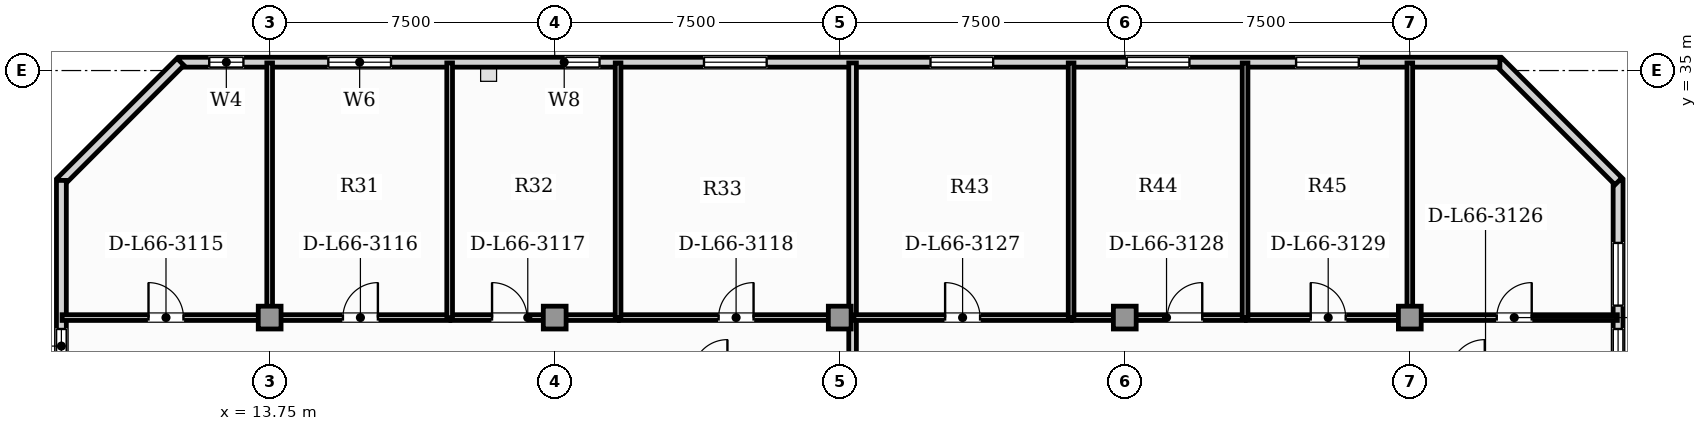
"""IFC4 building model, lengths in metres.
Left out: names, types, materials, properties, quantities, classifications, styles, units other than length and angle.
Written with IfcOpenShell. Run it as: python <this file> out.ifc"""

import sys

from ifc_helpers import new_model, si_unit, direction, frame, frame_2d, origin, origin_2d, place, context, subcontext, project, spatial, rectangle, extrude, element, fill, save


model = new_model("IFC4")
c1 = context("Model", 3, precision=1e-05, world=origin(), true_north=direction((0.0, 1.0)))
c2 = subcontext(c1, "Body", "Model", "MODEL_VIEW")
j1 = project(units=[si_unit("LENGTHUNIT", "METRE"), si_unit("PLANEANGLEUNIT", "RADIAN")], contexts=[c1])
p1 = place(None, origin())
s1 = spatial("IfcSite", under=j1, at=p1, CompositionType="ELEMENT")
p2 = place(p1, origin())
s2 = spatial("IfcBuilding", under=s1, at=p2, CompositionType="ELEMENT")
p3 = place(p2, frame((0.0, 0.0, 268.3)))
s3 = spatial("IfcBuildingStorey", under=s2, at=p3, CompositionType="ELEMENT", Elevation=268.3)
for number, where, z_axis, x_axis in (
    (1, (13.75, 28.5, 0.0), (0.0, 0.0, 1.0), (1.0, 0.0, 0.0)),
    (2, (21.25, 28.5, 0.0), (0.0, 0.0, 1.0), (1.0, 0.0, 0.0)),
    (3, (28.75, 28.5, 0.0), (0.0, 0.0, 1.0), (1.0, 0.0, 0.0)),
    (4, (36.25, 28.5, 0.0), (0.0, 0.0, 1.0), (1.0, 0.0, 0.0)),
    (5, (43.75, 28.5, 0.0), (0.0, 0.0, 1.0), (1.0, 0.0, 0.0)),
):
    element("IfcColumn", number, at=place(p3, frame(where, z_axis=z_axis, x_axis=x_axis)), inside=s3, PredefinedType="COLUMN", context=c2, shape_type="SweptSolid", body=[
        extrude(rectangle(XDim=0.6, YDim=0.6, at=origin_2d()), origin(), (0.0, 0.0, 1.0), 3.85),
    ])
p4 = place(p3, frame((49.23, 24.315, 0.0), z_axis=(0.0, 0.0, 1.0), x_axis=(0.0, 1.0, 0.0)))
e6 = element("IfcWall", 6, at=p4, inside=s3, PredefinedType="SOLIDWALL", context=c2, shape_type="SweptSolid", body=[
    extrude(rectangle(XDim=7.795, YDim=0.26, at=frame_2d((3.897, 0.0))), origin(), (0.0, 0.0, 1.0), 3.65),
])
p5 = place(p4, frame((2.985, 0.0, 0.95)))
e7 = element("IfcOpeningElement", 7, at=p5, cuts=e6, PredefinedType="OPENING", context=c2, shape_type="SweptSolid", body=[
    extrude(rectangle(XDim=0.9, YDim=1.5, at=frame_2d((0.45, 0.75))), frame((0.0, 0.14, 0.0), z_axis=(0.0, -1.0, 0.0), x_axis=(1.0, 0.0, 0.0)), (0.0, 0.0, 1.0), 0.28),
])
p6 = place(p4, frame((4.5, 0.0, 0.88)))
e8 = element("IfcOpeningElement", 8, at=p6, cuts=e6, PredefinedType="OPENING", context=c2, shape_type="SweptSolid", body=[
    extrude(rectangle(XDim=1.65, YDim=2.0, at=frame_2d((0.825, 1.0))), frame((0.0, 0.14, 0.0), z_axis=(0.0, -1.0, 0.0), x_axis=(1.0, 0.0, 0.0)), (0.0, 0.0, 1.0), 0.28),
])
p7 = place(p3, frame((49.24, 32.086, 0.0), z_axis=(0.0, 0.0, 1.0), x_axis=(-0.707079321262, 0.707134240044, 0.0)))
e9 = element("IfcWall", 9, at=p7, inside=s3, PredefinedType="SOLIDWALL", context=c2, shape_type="SweptSolid", body=[
    extrude(rectangle(XDim=4.446, YDim=0.26, at=frame_2d((2.223, 0.0))), origin(), (0.0, 0.0, 1.0), 3.65),
])
p8 = place(p3, frame((46.12, 35.219, 0.0), z_axis=(0.0, 0.0, 1.0), x_axis=(-1.0, 0.0, 0.0)))
e10 = element("IfcWall", 10, at=p8, inside=s3, PredefinedType="SOLIDWALL", context=c2, shape_type="SweptSolid", body=[
    extrude(rectangle(XDim=34.74, YDim=0.26, at=frame_2d((17.37, 0.0))), origin(), (0.0, 0.0, 1.0), 3.65),
])
p9 = place(p8, frame((33.06, 0.0, 0.95)))
e11 = element("IfcOpeningElement", 11, at=p9, cuts=e10, PredefinedType="OPENING", context=c2, shape_type="SweptSolid", body=[
    extrude(rectangle(XDim=0.9, YDim=1.5, at=frame_2d((0.45, 0.75))), frame((0.0, 0.14, 0.0), z_axis=(0.0, -1.0, 0.0), x_axis=(1.0, 0.0, 0.0)), (0.0, 0.0, 1.0), 0.28),
])
p10 = place(p8, frame((29.177, 0.0, 0.88)))
e12 = element("IfcOpeningElement", 12, at=p10, cuts=e10, PredefinedType="OPENING", context=c2, shape_type="SweptSolid", body=[
    extrude(rectangle(XDim=1.65, YDim=2.0, at=frame_2d((0.825, 1.0))), frame((0.0, 0.14, 0.0), z_axis=(0.0, -1.0, 0.0), x_axis=(1.0, 0.0, 0.0)), (0.0, 0.0, 1.0), 0.28),
])
p11 = place(p8, frame((23.69, 0.0, 0.9)))
e13 = element("IfcOpeningElement", 13, at=p11, cuts=e10, PredefinedType="OPENING", context=c2, shape_type="SweptSolid", body=[
    extrude(rectangle(XDim=0.9, YDim=1.4, at=frame_2d((0.45, 0.7))), frame((0.0, 0.14, 0.0), z_axis=(0.0, -1.0, 0.0), x_axis=(1.0, 0.0, 0.0)), (0.0, 0.0, 1.0), 0.28),
])
p12 = place(p8, frame((19.292, 0.0, 0.88)))
e14 = element("IfcOpeningElement", 14, at=p12, cuts=e10, PredefinedType="OPENING", context=c2, shape_type="SweptSolid", body=[
    extrude(rectangle(XDim=1.65, YDim=2.0, at=frame_2d((0.825, 1.0))), frame((0.0, 0.14, 0.0), z_axis=(0.0, -1.0, 0.0), x_axis=(1.0, 0.0, 0.0)), (0.0, 0.0, 1.0), 0.28),
])
p13 = place(p8, frame((13.332, 0.0, 0.88)))
e15 = element("IfcOpeningElement", 15, at=p13, cuts=e10, PredefinedType="OPENING", context=c2, shape_type="SweptSolid", body=[
    extrude(rectangle(XDim=1.65, YDim=2.0, at=frame_2d((0.825, 1.0))), frame((0.0, 0.14, 0.0), z_axis=(0.0, -1.0, 0.0), x_axis=(1.0, 0.0, 0.0)), (0.0, 0.0, 1.0), 0.28),
])
p14 = place(p8, frame((8.169, 0.0, 0.88)))
e16 = element("IfcOpeningElement", 16, at=p14, cuts=e10, PredefinedType="OPENING", context=c2, shape_type="SweptSolid", body=[
    extrude(rectangle(XDim=1.65, YDim=2.0, at=frame_2d((0.825, 1.0))), frame((0.0, 0.14, 0.0), z_axis=(0.0, -1.0, 0.0), x_axis=(1.0, 0.0, 0.0)), (0.0, 0.0, 1.0), 0.28),
])
p15 = place(p8, frame((3.712, 0.0, 0.88)))
e17 = element("IfcOpeningElement", 17, at=p15, cuts=e10, PredefinedType="OPENING", context=c2, shape_type="SweptSolid", body=[
    extrude(rectangle(XDim=1.65, YDim=2.0, at=frame_2d((0.825, 1.0))), frame((0.0, 0.14, 0.0), z_axis=(0.0, -1.0, 0.0), x_axis=(1.0, 0.0, 0.0)), (0.0, 0.0, 1.0), 0.28),
])
p16 = place(p3, frame((11.403, 35.229, 0.0), z_axis=(0.0, 0.0, 1.0), x_axis=(-0.707079321262, -0.707134240044, 0.0)))
e18 = element("IfcWall", 18, at=p16, inside=s3, PredefinedType="SOLIDWALL", context=c2, shape_type="SweptSolid", body=[
    extrude(rectangle(XDim=4.446, YDim=0.26, at=frame_2d((2.223, 0.0))), origin(), (0.0, 0.0, 1.0), 3.65),
])
p17 = place(p3, frame((8.27, 32.109, 0.0), z_axis=(0.0, 0.0, 1.0), x_axis=(0.0, -1.0, 0.0)))
e19 = element("IfcWall", 19, at=p17, inside=s3, PredefinedType="SOLIDWALL", context=c2, shape_type="SweptSolid", body=[
    extrude(rectangle(XDim=7.795, YDim=0.26, at=frame_2d((3.897, 0.0))), origin(), (0.0, 0.0, 1.0), 3.65),
])
p18 = place(p17, frame((3.909, 0.0, 0.95)))
e20 = element("IfcOpeningElement", 20, at=p18, cuts=e19, PredefinedType="OPENING", context=c2, shape_type="SweptSolid", body=[
    extrude(rectangle(XDim=0.9, YDim=1.5, at=frame_2d((0.45, 0.75))), frame((0.0, 0.14, 0.0), z_axis=(0.0, -1.0, 0.0), x_axis=(1.0, 0.0, 0.0)), (0.0, 0.0, 1.0), 0.28),
])
p19 = place(p3, frame((8.289, 28.5, 0.0), z_axis=(0.0, 0.0, 1.0), x_axis=(1.0, 0.0, 0.0)))
e21 = element("IfcWall", 21, at=p19, inside=s3, PredefinedType="PARTITIONING", context=c2, shape_type="SweptSolid", body=[
    extrude(rectangle(XDim=5.466, YDim=0.15, at=frame_2d((2.733, 0.0))), origin(), (0.0, 0.0, 1.0), 3.65),
])
p20 = place(p19, frame((2.273, 0.0, 0.0)))
e22 = element("IfcOpeningElement", 22, at=p20, cuts=e21, PredefinedType="OPENING", context=c2, shape_type="SweptSolid", body=[
    extrude(rectangle(XDim=0.92, YDim=2.1, at=frame_2d((0.46, 1.05))), frame((0.0, 0.085, 0.0), z_axis=(0.0, -1.0, 0.0), x_axis=(1.0, 0.0, 0.0)), (0.0, 0.0, 1.0), 0.17),
])
p21 = place(p3, frame((13.785, 28.5, 0.0), z_axis=(0.0, 0.0, 1.0), x_axis=(1.0, 0.0, 0.0)))
e23 = element("IfcWall", 23, at=p21, inside=s3, PredefinedType="PARTITIONING", context=c2, shape_type="SweptSolid", body=[
    extrude(rectangle(XDim=4.706, YDim=0.15, at=frame_2d((2.353, 0.0))), origin(), (0.0, 0.0, 1.0), 3.105),
])
p22 = place(p21, frame((1.893, 0.0, 0.0)))
e24 = element("IfcOpeningElement", 24, at=p22, cuts=e23, PredefinedType="OPENING", context=c2, shape_type="SweptSolid", body=[
    extrude(rectangle(XDim=0.92, YDim=2.1, at=frame_2d((0.46, 1.05))), frame((0.0, 0.085, 0.0), z_axis=(0.0, -1.0, 0.0), x_axis=(1.0, 0.0, 0.0)), (0.0, 0.0, 1.0), 0.17),
])
p23 = place(p3, frame((18.521, 28.5, 0.0), z_axis=(0.0, 0.0, 1.0), x_axis=(1.0, 0.0, 0.0)))
e25 = element("IfcWall", 25, at=p23, inside=s3, PredefinedType="PARTITIONING", context=c2, shape_type="SweptSolid", body=[
    extrude(rectangle(XDim=4.402, YDim=0.15, at=frame_2d((2.201, 0.0))), origin(), (0.0, 0.0, 1.0), 3.105),
])
p24 = place(p23, frame((1.081, 0.0, 0.0)))
e26 = element("IfcOpeningElement", 26, at=p24, cuts=e25, PredefinedType="OPENING", context=c2, shape_type="SweptSolid", body=[
    extrude(rectangle(XDim=0.92, YDim=2.1, at=frame_2d((0.46, 1.05))), frame((0.0, 0.085, 0.0), z_axis=(0.0, -1.0, 0.0), x_axis=(1.0, 0.0, 0.0)), (0.0, 0.0, 1.0), 0.17),
])
p25 = place(p3, frame((22.953, 28.5, 0.0), z_axis=(0.0, 0.0, 1.0), x_axis=(1.0, 0.0, 0.0)))
e27 = element("IfcWall", 27, at=p25, inside=s3, PredefinedType="PARTITIONING", context=c2, shape_type="SweptSolid", body=[
    extrude(rectangle(XDim=6.14, YDim=0.15, at=frame_2d((3.07, 0.0))), origin(), (0.0, 0.0, 1.0), 3.105),
])
p26 = place(p25, frame((2.61, 0.0, 0.0)))
e28 = element("IfcOpeningElement", 28, at=p26, cuts=e27, PredefinedType="OPENING", context=c2, shape_type="SweptSolid", body=[
    extrude(rectangle(XDim=0.92, YDim=2.1, at=frame_2d((0.46, 1.05))), frame((0.0, 0.085, 0.0), z_axis=(0.0, -1.0, 0.0), x_axis=(1.0, 0.0, 0.0)), (0.0, 0.0, 1.0), 0.17),
])
p27 = place(p3, frame((29.088, 26.995, 0.0), z_axis=(0.0, 0.0, 1.0), x_axis=(0.0, 1.0, 0.0)))
e29 = element("IfcWall", 29, at=p27, inside=s3, PredefinedType="PARTITIONING", context=c2, shape_type="SweptSolid", body=[
    extrude(rectangle(XDim=1.51, YDim=0.2, at=frame_2d((0.755, 0.0))), origin(), (0.0, 0.0, 1.0), 3.65),
])
for number, where, z_axis, x_axis in (
    (30, (13.75, 28.495, 0.0), (0.0, 0.0, 1.0), (0.0, 1.0, 0.0)),
    (31, (18.486, 28.495, 0.0), (0.0, 0.0, 1.0), (0.0, 1.0, 0.0)),
    (32, (22.918, 28.495, 0.0), (0.0, 0.0, 1.0), (0.0, 1.0, 0.0)),
):
    element("IfcWall", number, at=place(p3, frame(where, z_axis=z_axis, x_axis=x_axis)), inside=s3, PredefinedType="PARTITIONING", context=c2, shape_type="SweptSolid", body=[
        extrude(rectangle(XDim=6.705, YDim=0.15, at=frame_2d((3.353, 0.0))), origin(), (0.0, 0.0, 1.0), 3.65),
    ])
p28 = place(p3, frame((29.088, 28.535, 0.0), z_axis=(0.0, 0.0, 1.0), x_axis=(0.0, 1.0, 0.0)))
e33 = element("IfcWall", 33, at=p28, inside=s3, PredefinedType="PARTITIONING", context=c2, shape_type="SweptSolid", body=[
    extrude(rectangle(XDim=6.665, YDim=0.2, at=frame_2d((3.333, 0.0))), origin(), (0.0, 0.0, 1.0), 3.65),
])
p29 = place(p3, frame((29.123, 28.5, 0.0), z_axis=(0.0, 0.0, 1.0), x_axis=(1.0, 0.0, 0.0)))
e34 = element("IfcWall", 34, at=p29, inside=s3, PredefinedType="PARTITIONING", context=c2, shape_type="SweptSolid", body=[
    extrude(rectangle(XDim=5.72, YDim=0.15, at=frame_2d((2.86, 0.0))), origin(), (0.0, 0.0, 1.0), 3.105),
])
p30 = place(p29, frame((2.4, 0.0, 0.0)))
e35 = element("IfcOpeningElement", 35, at=p30, cuts=e34, PredefinedType="OPENING", context=c2, shape_type="SweptSolid", body=[
    extrude(rectangle(XDim=0.92, YDim=2.1, at=frame_2d((0.46, 1.05))), frame((0.0, 0.085, 0.0), z_axis=(0.0, -1.0, 0.0), x_axis=(1.0, 0.0, 0.0)), (0.0, 0.0, 1.0), 0.17),
])
p31 = place(p3, frame((34.873, 28.5, 0.0), z_axis=(0.0, 0.0, 1.0), x_axis=(1.0, 0.0, 0.0)))
e36 = element("IfcWall", 36, at=p31, inside=s3, PredefinedType="PARTITIONING", context=c2, shape_type="SweptSolid", body=[
    extrude(rectangle(XDim=4.548, YDim=0.15, at=frame_2d((2.274, 0.0))), origin(), (0.0, 0.0, 1.0), 3.105),
])
p32 = place(p31, frame((2.496, 0.0, 0.0)))
e37 = element("IfcOpeningElement", 37, at=p32, cuts=e36, PredefinedType="OPENING", context=c2, shape_type="SweptSolid", body=[
    extrude(rectangle(XDim=0.92, YDim=2.1, at=frame_2d((0.46, 1.05))), frame((0.0, 0.085, 0.0), z_axis=(0.0, -1.0, 0.0), x_axis=(1.0, 0.0, 0.0)), (0.0, 0.0, 1.0), 0.17),
])
p33 = place(p3, frame((39.45, 28.5, 0.0), z_axis=(0.0, 0.0, 1.0), x_axis=(1.0, 0.0, 0.0)))
e38 = element("IfcWall", 38, at=p33, inside=s3, PredefinedType="PARTITIONING", context=c2, shape_type="SweptSolid", body=[
    extrude(rectangle(XDim=4.305, YDim=0.15, at=frame_2d((2.152, 0.0))), origin(), (0.0, 0.0, 1.0), 3.105),
])
p34 = place(p33, frame((1.692, 0.0, 0.0)))
e39 = element("IfcOpeningElement", 39, at=p34, cuts=e38, PredefinedType="OPENING", context=c2, shape_type="SweptSolid", body=[
    extrude(rectangle(XDim=0.92, YDim=2.1, at=frame_2d((0.46, 1.05))), frame((0.0, 0.085, 0.0), z_axis=(0.0, -1.0, 0.0), x_axis=(1.0, 0.0, 0.0)), (0.0, 0.0, 1.0), 0.17),
])
p35 = place(p3, frame((43.785, 28.5, 0.0), z_axis=(0.0, 0.0, 1.0), x_axis=(1.0, 0.0, 0.0)))
e40 = element("IfcWall", 40, at=p35, inside=s3, PredefinedType="PARTITIONING", context=c2, shape_type="SweptSolid", body=[
    extrude(rectangle(XDim=5.426, YDim=0.15, at=frame_2d((2.713, 0.0))), origin(), (0.0, 0.0, 1.0), 3.65),
])
p36 = place(p35, frame((2.253, 0.0, 0.0)))
e41 = element("IfcOpeningElement", 41, at=p36, cuts=e40, PredefinedType="OPENING", context=c2, shape_type="SweptSolid", body=[
    extrude(rectangle(XDim=0.92, YDim=2.1, at=frame_2d((0.46, 1.05))), frame((0.0, 0.085, 0.0), z_axis=(0.0, -1.0, 0.0), x_axis=(1.0, 0.0, 0.0)), (0.0, 0.0, 1.0), 0.17),
])
for number, where, z_axis, x_axis in (
    (42, (34.838, 28.495, 0.0), (0.0, 0.0, 1.0), (0.0, 1.0, 0.0)),
    (43, (39.415, 28.495, 0.0), (0.0, 0.0, 1.0), (0.0, 1.0, 0.0)),
    (44, (43.75, 28.495, 0.0), (0.0, 0.0, 1.0), (0.0, 1.0, 0.0)),
):
    element("IfcWall", number, at=place(p3, frame(where, z_axis=z_axis, x_axis=x_axis)), inside=s3, PredefinedType="PARTITIONING", context=c2, shape_type="SweptSolid", body=[
        extrude(rectangle(XDim=6.705, YDim=0.15, at=frame_2d((3.353, 0.0))), origin(), (0.0, 0.0, 1.0), 3.65),
    ])
p37 = place(p18, origin())
e45 = element("IfcWindow", 45, at=p37, inside=s3, PartitioningType="SINGLE_PANEL", PredefinedType="WINDOW", context=c2, shape_type="SweptSolid", body=[
    extrude(rectangle(XDim=0.9, YDim=1.5, at=frame_2d((0.45, 0.75))), frame((0.0, 0.03, 0.0), z_axis=(0.0, -1.0, 0.0), x_axis=(1.0, 0.0, 0.0)), (0.0, 0.0, 1.0), 0.06),
])
fill(e20, e45)
p38 = place(p9, origin())
e46 = element("IfcWindow", 46, at=p38, inside=s3, PartitioningType="SINGLE_PANEL", PredefinedType="WINDOW", context=c2, shape_type="SweptSolid", body=[
    extrude(rectangle(XDim=0.9, YDim=1.5, at=frame_2d((0.45, 0.75))), frame((0.0, 0.03, 0.0), z_axis=(0.0, -1.0, 0.0), x_axis=(1.0, 0.0, 0.0)), (0.0, 0.0, 1.0), 0.06),
])
fill(e11, e46)
p39 = place(p10, origin())
e47 = element("IfcWindow", 47, at=p39, inside=s3, PartitioningType="SINGLE_PANEL", PredefinedType="WINDOW", context=c2, shape_type="SweptSolid", body=[
    extrude(rectangle(XDim=1.65, YDim=2.0, at=frame_2d((0.825, 1.0))), frame((0.0, 0.03, 0.0), z_axis=(0.0, -1.0, 0.0), x_axis=(1.0, 0.0, 0.0)), (0.0, 0.0, 1.0), 0.06),
])
fill(e12, e47)
p40 = place(p11, origin())
e48 = element("IfcWindow", 48, at=p40, inside=s3, PartitioningType="SINGLE_PANEL", PredefinedType="WINDOW", context=c2, shape_type="SweptSolid", body=[
    extrude(rectangle(XDim=0.9, YDim=1.4, at=frame_2d((0.45, 0.7))), frame((0.0, 0.03, 0.0), z_axis=(0.0, -1.0, 0.0), x_axis=(1.0, 0.0, 0.0)), (0.0, 0.0, 1.0), 0.06),
])
fill(e13, e48)
p41 = place(p12, origin())
e49 = element("IfcWindow", 49, at=p41, inside=s3, PartitioningType="SINGLE_PANEL", PredefinedType="WINDOW", context=c2, shape_type="SweptSolid", body=[
    extrude(rectangle(XDim=1.65, YDim=2.0, at=frame_2d((0.825, 1.0))), frame((0.0, 0.03, 0.0), z_axis=(0.0, -1.0, 0.0), x_axis=(1.0, 0.0, 0.0)), (0.0, 0.0, 1.0), 0.06),
])
fill(e14, e49)
p42 = place(p5, origin())
e50 = element("IfcWindow", 50, at=p42, inside=s3, PartitioningType="SINGLE_PANEL", PredefinedType="WINDOW", context=c2, shape_type="SweptSolid", body=[
    extrude(rectangle(XDim=0.9, YDim=1.5, at=frame_2d((0.45, 0.75))), frame((0.0, 0.03, 0.0), z_axis=(0.0, -1.0, 0.0), x_axis=(1.0, 0.0, 0.0)), (0.0, 0.0, 1.0), 0.06),
])
fill(e7, e50)
p43 = place(p13, origin())
e51 = element("IfcWindow", 51, at=p43, inside=s3, PartitioningType="SINGLE_PANEL", PredefinedType="WINDOW", context=c2, shape_type="SweptSolid", body=[
    extrude(rectangle(XDim=1.65, YDim=2.0, at=frame_2d((0.825, 1.0))), frame((0.0, 0.03, 0.0), z_axis=(0.0, -1.0, 0.0), x_axis=(1.0, 0.0, 0.0)), (0.0, 0.0, 1.0), 0.06),
])
fill(e15, e51)
p44 = place(p14, origin())
e52 = element("IfcWindow", 52, at=p44, inside=s3, PartitioningType="SINGLE_PANEL", PredefinedType="WINDOW", context=c2, shape_type="SweptSolid", body=[
    extrude(rectangle(XDim=1.65, YDim=2.0, at=frame_2d((0.825, 1.0))), frame((0.0, 0.03, 0.0), z_axis=(0.0, -1.0, 0.0), x_axis=(1.0, 0.0, 0.0)), (0.0, 0.0, 1.0), 0.06),
])
fill(e16, e52)
p45 = place(p15, origin())
e53 = element("IfcWindow", 53, at=p45, inside=s3, PartitioningType="SINGLE_PANEL", PredefinedType="WINDOW", context=c2, shape_type="SweptSolid", body=[
    extrude(rectangle(XDim=1.65, YDim=2.0, at=frame_2d((0.825, 1.0))), frame((0.0, 0.03, 0.0), z_axis=(0.0, -1.0, 0.0), x_axis=(1.0, 0.0, 0.0)), (0.0, 0.0, 1.0), 0.06),
])
fill(e17, e53)
p46 = place(p6, origin())
e54 = element("IfcWindow", 54, at=p46, inside=s3, PartitioningType="SINGLE_PANEL", PredefinedType="WINDOW", context=c2, shape_type="SweptSolid", body=[
    extrude(rectangle(XDim=1.65, YDim=2.0, at=frame_2d((0.825, 1.0))), frame((0.0, 0.03, 0.0), z_axis=(0.0, -1.0, 0.0), x_axis=(1.0, 0.0, 0.0)), (0.0, 0.0, 1.0), 0.06),
])
fill(e8, e54)
p47 = place(p20, origin())
e55 = element("IfcDoor", 55, at=p47, inside=s3, OperationType="SINGLE_SWING_LEFT", PredefinedType="DOOR", context=c2, shape_type="SweptSolid", body=[
    extrude(rectangle(XDim=0.92, YDim=2.1, at=frame_2d((0.46, 1.05))), frame((0.0, 0.025, 0.0), z_axis=(0.0, -1.0, 0.0), x_axis=(1.0, 0.0, 0.0)), (0.0, 0.0, 1.0), 0.05),
])
fill(e22, e55)
p48 = place(p22, origin())
e56 = element("IfcDoor", 56, at=p48, inside=s3, OperationType="SINGLE_SWING_RIGHT", PredefinedType="DOOR", context=c2, shape_type="SweptSolid", body=[
    extrude(rectangle(XDim=0.92, YDim=2.1, at=frame_2d((0.46, 1.05))), frame((0.0, 0.025, 0.0), z_axis=(0.0, -1.0, 0.0), x_axis=(1.0, 0.0, 0.0)), (0.0, 0.0, 1.0), 0.05),
])
fill(e24, e56)
p49 = place(p24, origin())
e57 = element("IfcDoor", 57, at=p49, inside=s3, OperationType="SINGLE_SWING_LEFT", PredefinedType="DOOR", context=c2, shape_type="SweptSolid", body=[
    extrude(rectangle(XDim=0.92, YDim=2.1, at=frame_2d((0.46, 1.05))), frame((0.0, 0.025, 0.0), z_axis=(0.0, -1.0, 0.0), x_axis=(1.0, 0.0, 0.0)), (0.0, 0.0, 1.0), 0.05),
])
fill(e26, e57)
p50 = place(p26, origin())
e58 = element("IfcDoor", 58, at=p50, inside=s3, OperationType="SINGLE_SWING_RIGHT", PredefinedType="DOOR", context=c2, shape_type="SweptSolid", body=[
    extrude(rectangle(XDim=0.92, YDim=2.1, at=frame_2d((0.46, 1.05))), frame((0.0, 0.025, 0.0), z_axis=(0.0, -1.0, 0.0), x_axis=(1.0, 0.0, 0.0)), (0.0, 0.0, 1.0), 0.05),
])
fill(e28, e58)
p51 = place(p30, origin())
e59 = element("IfcDoor", 59, at=p51, inside=s3, OperationType="SINGLE_SWING_LEFT", PredefinedType="DOOR", context=c2, shape_type="SweptSolid", body=[
    extrude(rectangle(XDim=0.92, YDim=2.1, at=frame_2d((0.46, 1.05))), frame((0.0, 0.025, 0.0), z_axis=(0.0, -1.0, 0.0), x_axis=(1.0, 0.0, 0.0)), (0.0, 0.0, 1.0), 0.05),
])
fill(e35, e59)
p52 = place(p32, origin())
e60 = element("IfcDoor", 60, at=p52, inside=s3, OperationType="SINGLE_SWING_RIGHT", PredefinedType="DOOR", context=c2, shape_type="SweptSolid", body=[
    extrude(rectangle(XDim=0.92, YDim=2.1, at=frame_2d((0.46, 1.05))), frame((0.0, 0.025, 0.0), z_axis=(0.0, -1.0, 0.0), x_axis=(1.0, 0.0, 0.0)), (0.0, 0.0, 1.0), 0.05),
])
fill(e37, e60)
p53 = place(p34, origin())
e61 = element("IfcDoor", 61, at=p53, inside=s3, OperationType="SINGLE_SWING_LEFT", PredefinedType="DOOR", context=c2, shape_type="SweptSolid", body=[
    extrude(rectangle(XDim=0.92, YDim=2.1, at=frame_2d((0.46, 1.05))), frame((0.0, 0.025, 0.0), z_axis=(0.0, -1.0, 0.0), x_axis=(1.0, 0.0, 0.0)), (0.0, 0.0, 1.0), 0.05),
])
fill(e39, e61)
p54 = place(p36, origin())
e62 = element("IfcDoor", 62, at=p54, inside=s3, OperationType="SINGLE_SWING_RIGHT", PredefinedType="DOOR", context=c2, shape_type="SweptSolid", body=[
    extrude(rectangle(XDim=0.92, YDim=2.1, at=frame_2d((0.46, 1.05))), frame((0.0, 0.025, 0.0), z_axis=(0.0, -1.0, 0.0), x_axis=(1.0, 0.0, 0.0)), (0.0, 0.0, 1.0), 0.05),
])
fill(e41, e62)
save(model, sys.argv[1])
